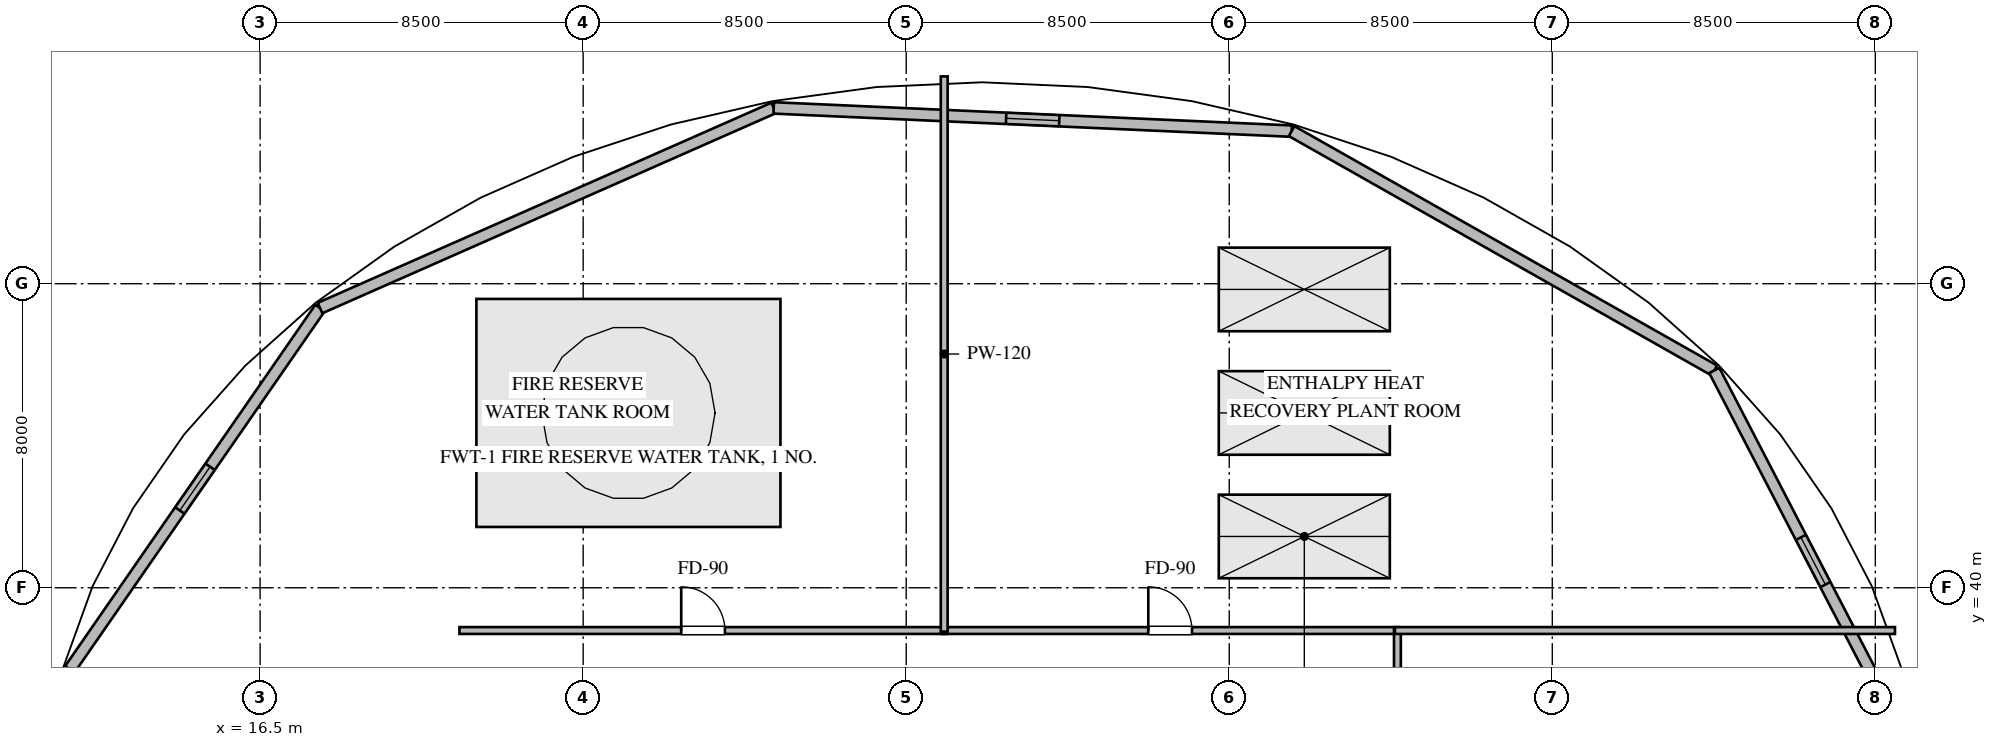
"""IFC4 building model, lengths in metres.
Left out: names, types, materials, properties, quantities, classifications, styles, units other than length and angle.
Written with IfcOpenShell. Run it as: python <this file> out.ifc"""

import sys

from ifc_helpers import new_model, si_unit, direction, frame, frame_2d, origin, place, context, subcontext, project, spatial, rectangle, extrude, element, fill, save


model = new_model("IFC4")
c1 = context("Model", 3, precision=1e-05, world=origin(), true_north=direction((0.0, 1.0)))
c2 = subcontext(c1, "Body", "Model", "MODEL_VIEW")
j1 = project(units=[si_unit("LENGTHUNIT", "METRE"), si_unit("PLANEANGLEUNIT", "RADIAN")], contexts=[c1])
p1 = place(None, origin())
s1 = spatial("IfcSite", under=j1, at=p1, CompositionType="ELEMENT")
p2 = place(p1, origin())
s2 = spatial("IfcBuilding", under=s1, at=p2, CompositionType="ELEMENT")
p3 = place(p2, frame((0.0, 0.0, 296.8)))
s3 = spatial("IfcBuildingStorey", under=s2, at=p3, CompositionType="ELEMENT", Elevation=296.8)
p4 = place(p3, frame((11.495, 37.856, 0.0), z_axis=(0.0, 0.0, 1.0), x_axis=(0.569269280193, 0.822151133691, 0.0)))
e1 = element("IfcWall", 1, at=p4, inside=s3, PredefinedType="STANDARD", context=c2, shape_type="SweptSolid", body=[
    extrude(rectangle(XDim=11.56, YDim=0.3, at=frame_2d((5.78, 0.0))), origin(), (0.0, 0.0, 1.0), 3.72),
])
p5 = place(p4, frame((5.08, 0.0, 1.2)))
e2 = element("IfcOpeningElement", 2, at=p5, cuts=e1, PredefinedType="OPENING", context=c2, shape_type="SweptSolid", body=[
    extrude(rectangle(XDim=1.4, YDim=1.2, at=frame_2d((0.7, 0.6))), frame((0.0, 0.16, 0.0), z_axis=(0.0, -1.0, 0.0), x_axis=(1.0, 0.0, 0.0)), (0.0, 0.0, 1.0), 0.32),
])
p6 = place(p3, frame((18.076, 47.36, 0.0), z_axis=(0.0, 0.0, 1.0), x_axis=(0.914943001047, 0.40358308294, 0.0)))
e3 = element("IfcWall", 3, at=p6, inside=s3, PredefinedType="STANDARD", context=c2, shape_type="SweptSolid", body=[
    extrude(rectangle(XDim=13.048, YDim=0.3, at=frame_2d((6.524, 0.0))), origin(), (0.0, 0.0, 1.0), 3.72),
])
p7 = place(p3, frame((30.014, 52.626, 0.0), z_axis=(0.0, 0.0, 1.0), x_axis=(0.998996211569, -0.04479474602, 0.0)))
e4 = element("IfcWall", 4, at=p7, inside=s3, PredefinedType="STANDARD", context=c2, shape_type="SweptSolid", body=[
    extrude(rectangle(XDim=13.642, YDim=0.3, at=frame_2d((6.821, 0.0))), origin(), (0.0, 0.0, 1.0), 3.72),
])
p8 = place(p7, frame((6.121, 0.0, 1.2)))
e5 = element("IfcOpeningElement", 5, at=p8, cuts=e4, PredefinedType="OPENING", context=c2, shape_type="SweptSolid", body=[
    extrude(rectangle(XDim=1.4, YDim=1.2, at=frame_2d((0.7, 0.6))), frame((0.0, 0.16, 0.0), z_axis=(0.0, -1.0, 0.0), x_axis=(1.0, 0.0, 0.0)), (0.0, 0.0, 1.0), 0.32),
])
p9 = place(p3, frame((43.642, 52.015, 0.0), z_axis=(0.0, 0.0, 1.0), x_axis=(0.870169378253, -0.492752730232, 0.0)))
e6 = element("IfcWall", 6, at=p9, inside=s3, PredefinedType="STANDARD", context=c2, shape_type="SweptSolid", body=[
    extrude(rectangle(XDim=12.779, YDim=0.3, at=frame_2d((6.39, 0.0))), origin(), (0.0, 0.0, 1.0), 3.72),
])
p10 = place(p3, frame((54.762, 45.718, 0.0), z_axis=(0.0, 0.0, 1.0), x_axis=(0.460623742834, -0.8875954977, 0.0)))
e7 = element("IfcWall", 7, at=p10, inside=s3, PredefinedType="STANDARD", context=c2, shape_type="SweptSolid", body=[
    extrude(rectangle(XDim=11.296, YDim=0.3, at=frame_2d((5.648, 0.0))), origin(), (0.0, 0.0, 1.0), 3.72),
])
p11 = place(p10, frame((4.948, 0.0, 1.2)))
e8 = element("IfcOpeningElement", 8, at=p11, cuts=e7, PredefinedType="OPENING", context=c2, shape_type="SweptSolid", body=[
    extrude(rectangle(XDim=1.4, YDim=1.2, at=frame_2d((0.7, 0.6))), frame((0.0, 0.16, 0.0), z_axis=(0.0, -1.0, 0.0), x_axis=(1.0, 0.0, 0.0)), (0.0, 0.0, 1.0), 0.32),
])
p12 = place(p3, frame((21.745, 38.875, 0.0), z_axis=(0.0, 0.0, 1.0), x_axis=(1.0, 0.0, 0.0)))
e9 = element("IfcWall", 9, at=p12, inside=s3, PredefinedType="PARTITIONING", context=c2, shape_type="SweptSolid", body=[
    extrude(rectangle(XDim=12.82, YDim=0.18, at=frame_2d((6.41, 0.0))), origin(), (0.0, 0.0, 1.0), 3.72),
])
p13 = place(p12, frame((5.835, 0.0, 0.0)))
e10 = element("IfcOpeningElement", 10, at=p13, cuts=e9, PredefinedType="OPENING", context=c2, shape_type="SweptSolid", body=[
    extrude(rectangle(XDim=1.15, YDim=2.1, at=frame_2d((0.575, 1.05))), frame((0.0, 0.1, 0.0), z_axis=(0.0, -1.0, 0.0), x_axis=(1.0, 0.0, 0.0)), (0.0, 0.0, 1.0), 0.2),
])
p14 = place(p3, frame((34.435, 38.875, 0.0), z_axis=(0.0, 0.0, 1.0), x_axis=(1.0, 0.0, 0.0)))
e11 = element("IfcWall", 11, at=p14, inside=s3, PredefinedType="PARTITIONING", context=c2, shape_type="SweptSolid", body=[
    extrude(rectangle(XDim=12.02, YDim=0.18, at=frame_2d((6.01, 0.0))), origin(), (0.0, 0.0, 1.0), 3.72),
])
p15 = place(p14, frame((5.435, 0.0, 0.0)))
e12 = element("IfcOpeningElement", 12, at=p15, cuts=e11, PredefinedType="OPENING", context=c2, shape_type="SweptSolid", body=[
    extrude(rectangle(XDim=1.15, YDim=2.1, at=frame_2d((0.575, 1.05))), frame((0.0, 0.1, 0.0), z_axis=(0.0, -1.0, 0.0), x_axis=(1.0, 0.0, 0.0)), (0.0, 0.0, 1.0), 0.2),
])
p16 = place(p3, frame((46.425, 38.905, 0.0), z_axis=(0.0, 0.0, 1.0), x_axis=(0.0, -1.0, 0.0)))
e13 = element("IfcWall", 13, at=p16, inside=s3, PredefinedType="PARTITIONING", context=c2, shape_type="SweptSolid", body=[
    extrude(rectangle(XDim=15.56, YDim=0.18, at=frame_2d((7.78, 0.0))), origin(), (0.0, 0.0, 1.0), 3.72),
])
p17 = place(p16, frame((7.205, 0.0, 0.0)))
e14 = element("IfcOpeningElement", 14, at=p17, cuts=e13, PredefinedType="OPENING", context=c2, shape_type="SweptSolid", body=[
    extrude(rectangle(XDim=1.15, YDim=2.1, at=frame_2d((0.575, 1.05))), frame((0.0, 0.1, 0.0), z_axis=(0.0, -1.0, 0.0), x_axis=(1.0, 0.0, 0.0)), (0.0, 0.0, 1.0), 0.2),
])
p18 = place(p3, frame((34.5, 53.455, 0.0), z_axis=(0.0, 0.0, 1.0), x_axis=(0.0, -1.0, 0.0)))
e15 = element("IfcWall", 15, at=p18, inside=s3, PredefinedType="PARTITIONING", context=c2, shape_type="SweptSolid", body=[
    extrude(rectangle(XDim=14.61, YDim=0.18, at=frame_2d((7.305, 0.0))), origin(), (0.0, 0.0, 1.0), 3.72),
])
p19 = place(p3, frame((59.517, 38.875, 0.0), z_axis=(0.0, 0.0, 1.0), x_axis=(-1.0, 0.0, 0.0)))
e16 = element("IfcWall", 16, at=p19, inside=s3, PredefinedType="PARTITIONING", context=c2, shape_type="SweptSolid", body=[
    extrude(rectangle(XDim=13.157, YDim=0.18, at=frame_2d((6.579, 0.0))), origin(), (0.0, 0.0, 1.0), 3.72),
])
p20 = place(p5, origin())
e17 = element("IfcWindow", 17, at=p20, inside=s3, PartitioningType="SINGLE_PANEL", PredefinedType="WINDOW", context=c2, shape_type="SweptSolid", body=[
    extrude(rectangle(XDim=1.4, YDim=1.2, at=frame_2d((0.7, 0.6))), frame((0.0, 0.03, 0.0), z_axis=(0.0, -1.0, 0.0), x_axis=(1.0, 0.0, 0.0)), (0.0, 0.0, 1.0), 0.06),
])
fill(e2, e17)
p21 = place(p8, origin())
e18 = element("IfcWindow", 18, at=p21, inside=s3, PartitioningType="SINGLE_PANEL", PredefinedType="WINDOW", context=c2, shape_type="SweptSolid", body=[
    extrude(rectangle(XDim=1.4, YDim=1.2, at=frame_2d((0.7, 0.6))), frame((0.0, 0.03, 0.0), z_axis=(0.0, -1.0, 0.0), x_axis=(1.0, 0.0, 0.0)), (0.0, 0.0, 1.0), 0.06),
])
fill(e5, e18)
p22 = place(p11, origin())
e19 = element("IfcWindow", 19, at=p22, inside=s3, PartitioningType="SINGLE_PANEL", PredefinedType="WINDOW", context=c2, shape_type="SweptSolid", body=[
    extrude(rectangle(XDim=1.4, YDim=1.2, at=frame_2d((0.7, 0.6))), frame((0.0, 0.03, 0.0), z_axis=(0.0, -1.0, 0.0), x_axis=(1.0, 0.0, 0.0)), (0.0, 0.0, 1.0), 0.06),
])
fill(e8, e19)
p23 = place(p13, origin())
e20 = element("IfcDoor", 20, at=p23, inside=s3, OperationType="SINGLE_SWING_LEFT", PredefinedType="DOOR", context=c2, shape_type="SweptSolid", body=[
    extrude(rectangle(XDim=1.15, YDim=2.1, at=frame_2d((0.575, 1.05))), frame((0.0, 0.025, 0.0), z_axis=(0.0, -1.0, 0.0), x_axis=(1.0, 0.0, 0.0)), (0.0, 0.0, 1.0), 0.05),
])
fill(e10, e20)
p24 = place(p15, origin())
e21 = element("IfcDoor", 21, at=p24, inside=s3, OperationType="SINGLE_SWING_LEFT", PredefinedType="DOOR", context=c2, shape_type="SweptSolid", body=[
    extrude(rectangle(XDim=1.15, YDim=2.1, at=frame_2d((0.575, 1.05))), frame((0.0, 0.025, 0.0), z_axis=(0.0, -1.0, 0.0), x_axis=(1.0, 0.0, 0.0)), (0.0, 0.0, 1.0), 0.05),
])
fill(e12, e21)
save(model, sys.argv[1])
